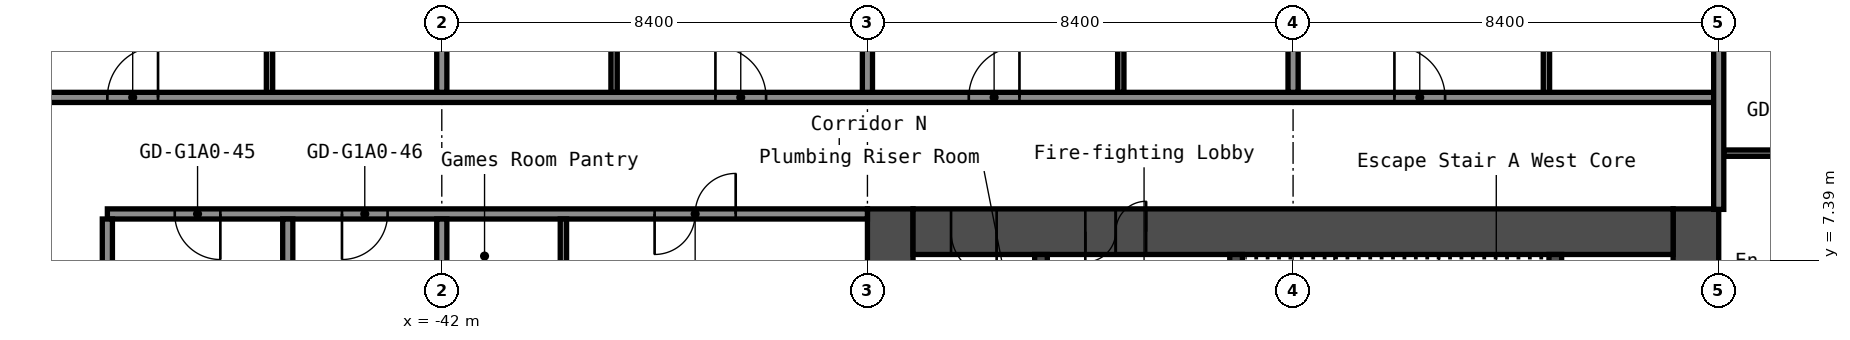
"""IFC4 building model, lengths in metres.
Left out: names, types, materials, properties, quantities, classifications, styles, units other than length and angle.
Written with IfcOpenShell. Run it as: python <this file> out.ifc"""

import sys

from ifc_helpers import new_model, si_unit, direction, frame, frame_2d, origin, place, context, subcontext, project, spatial, rectangle, extrude, element, fill, save


model = new_model("IFC4")
c1 = context("Model", 3, precision=1e-05, world=origin(), true_north=direction((0.0, 1.0)))
c2 = subcontext(c1, "Body", "Model", "MODEL_VIEW")
j1 = project(units=[si_unit("LENGTHUNIT", "METRE"), si_unit("PLANEANGLEUNIT", "RADIAN")], contexts=[c1])
p1 = place(None, origin())
s1 = spatial("IfcSite", under=j1, at=p1, CompositionType="ELEMENT")
p2 = place(p1, origin())
s2 = spatial("IfcBuilding", under=s1, at=p2, CompositionType="ELEMENT")
p3 = place(p2, frame((0.0, 0.0, 19.8)))
s3 = spatial("IfcBuildingStorey", under=s2, at=p3, CompositionType="ELEMENT", Elevation=19.8)
p4 = place(p3, frame((-17.25, -8.4, 0.0), z_axis=(0.0, 0.0, 1.0), x_axis=(0.0, 1.0, 0.0)))
e1 = element("IfcWall", 1, at=p4, inside=s3, PredefinedType="SHEAR", context=c2, shape_type="SweptSolid", body=[
    extrude(rectangle(XDim=16.8, YDim=0.9, at=frame_2d((8.4, 0.0))), origin(), (0.0, 0.0, 1.0), 2.8),
])
p5 = place(p4, frame((12.75, 0.0, 0.0)))
e2 = element("IfcOpeningElement", 2, at=p5, cuts=e1, PredefinedType="OPENING", context=c2, shape_type="SweptSolid", body=[
    extrude(rectangle(XDim=1.2, YDim=2.1, at=frame_2d((0.6, 1.05))), frame((0.0, 0.46, 0.0), z_axis=(0.0, -1.0, 0.0), x_axis=(1.0, 0.0, 0.0)), (0.0, 0.0, 1.0), 0.92),
])
p6 = place(p4, frame((2.85, 0.0, 0.0)))
e3 = element("IfcOpeningElement", 3, at=p6, cuts=e1, PredefinedType="OPENING", context=c2, shape_type="SweptSolid", body=[
    extrude(rectangle(XDim=1.2, YDim=2.1, at=frame_2d((0.6, 1.05))), frame((0.0, 0.46, 0.0), z_axis=(0.0, -1.0, 0.0), x_axis=(1.0, 0.0, 0.0)), (0.0, 0.0, 1.0), 0.92),
])
p7 = place(p3, frame((-33.15, -8.4, 0.0), z_axis=(0.0, 0.0, 1.0), x_axis=(0.0, 1.0, 0.0)))
e4 = element("IfcWall", 4, at=p7, inside=s3, PredefinedType="SHEAR", context=c2, shape_type="SweptSolid", body=[
    extrude(rectangle(XDim=16.8, YDim=0.9, at=frame_2d((8.4, 0.0))), origin(), (0.0, 0.0, 1.0), 2.8),
])
p8 = place(p3, frame((-32.7, 7.95, 0.0), z_axis=(0.0, 0.0, 1.0), x_axis=(1.0, 0.0, 0.0)))
e5 = element("IfcWall", 5, at=p8, inside=s3, PredefinedType="SHEAR", context=c2, shape_type="SweptSolid", body=[
    extrude(rectangle(XDim=15.0, YDim=0.9, at=frame_2d((7.5, 0.0))), origin(), (0.0, 0.0, 1.0), 2.8),
])
p9 = place(p8, frame((3.4, 0.0, 0.0)))
e6 = element("IfcOpeningElement", 6, at=p9, cuts=e5, PredefinedType="OPENING", context=c2, shape_type="SweptSolid", body=[
    extrude(rectangle(XDim=1.2, YDim=2.1, at=frame_2d((0.6, 1.05))), frame((0.0, 0.46, 0.0), z_axis=(0.0, -1.0, 0.0), x_axis=(1.0, 0.0, 0.0)), (0.0, 0.0, 1.0), 0.92),
])
p10 = place(p8, frame((0.75, 0.0, 0.0)))
e7 = element("IfcOpeningElement", 7, at=p10, cuts=e5, PredefinedType="OPENING", context=c2, shape_type="SweptSolid", body=[
    extrude(rectangle(XDim=0.9, YDim=2.1, at=frame_2d((0.45, 1.05))), frame((0.0, 0.46, 0.0), z_axis=(0.0, -1.0, 0.0), x_axis=(1.0, 0.0, 0.0)), (0.0, 0.0, 1.0), 0.92),
])
p11 = place(p3, frame((-20.025, 1.2, 0.0), z_axis=(0.0, 0.0, 1.0), x_axis=(0.0, 1.0, 0.0)))
e8 = element("IfcWall", 8, at=p11, inside=s3, PredefinedType="SHEAR", context=c2, shape_type="SweptSolid", body=[
    extrude(rectangle(XDim=6.3, YDim=0.25, at=frame_2d((3.15, 0.0))), origin(), (0.0, 0.0, 1.0), 2.8),
])
p12 = place(p3, frame((-26.325, 3.75, 0.0), z_axis=(0.0, 0.0, 1.0), x_axis=(0.0, 1.0, 0.0)))
e9 = element("IfcWall", 9, at=p12, inside=s3, PredefinedType="SHEAR", context=c2, shape_type="SweptSolid", body=[
    extrude(rectangle(XDim=3.75, YDim=0.25, at=frame_2d((1.875, 0.0))), origin(), (0.0, 0.0, 1.0), 2.8),
])
p13 = place(p12, frame((1.25, 0.0, 0.0)))
e10 = element("IfcOpeningElement", 10, at=p13, cuts=e9, PredefinedType="OPENING", context=c2, shape_type="SweptSolid", body=[
    extrude(rectangle(XDim=1.2, YDim=2.1, at=frame_2d((0.6, 1.05))), frame((0.0, 0.135, 0.0), z_axis=(0.0, -1.0, 0.0), x_axis=(1.0, 0.0, 0.0)), (0.0, 0.0, 1.0), 0.27),
])
p14 = place(p3, frame((-30.175, 1.45, 0.0), z_axis=(0.0, 0.0, 1.0), x_axis=(0.0, 1.0, 0.0)))
e11 = element("IfcWall", 11, at=p14, inside=s3, PredefinedType="SHEAR", context=c2, shape_type="SweptSolid", body=[
    extrude(rectangle(XDim=6.05, YDim=0.25, at=frame_2d((3.025, 0.0))), origin(), (0.0, 0.0, 1.0), 2.8),
])
p15 = place(p14, frame((2.625, 0.0, 0.0)))
e12 = element("IfcOpeningElement", 12, at=p15, cuts=e11, PredefinedType="OPENING", context=c2, shape_type="SweptSolid", body=[
    extrude(rectangle(XDim=1.1, YDim=2.1, at=frame_2d((0.55, 1.05))), frame((0.0, 0.135, 0.0), z_axis=(0.0, -1.0, 0.0), x_axis=(1.0, 0.0, 0.0)), (0.0, 0.0, 1.0), 0.27),
])
p16 = place(p3, frame((-48.6, 8.3, 0.0), z_axis=(0.0, 0.0, 1.0), x_axis=(1.0, 0.0, 0.0)))
e13 = element("IfcWall", 13, at=p16, inside=s3, PredefinedType="PARTITIONING", context=c2, shape_type="SweptSolid", body=[
    extrude(rectangle(XDim=15.0, YDim=0.2, at=frame_2d((7.5, 0.0))), origin(), (0.0, 0.0, 1.0), 2.8),
])
p17 = place(p16, frame((1.33, 0.0, 0.0)))
e14 = element("IfcOpeningElement", 14, at=p17, cuts=e13, PredefinedType="OPENING", context=c2, shape_type="SweptSolid", body=[
    extrude(rectangle(XDim=0.9, YDim=2.1, at=frame_2d((0.45, 1.05))), frame((0.0, 0.11, 0.0), z_axis=(0.0, -1.0, 0.0), x_axis=(1.0, 0.0, 0.0)), (0.0, 0.0, 1.0), 0.22),
])
p18 = place(p16, frame((4.63, 0.0, 0.0)))
e15 = element("IfcOpeningElement", 15, at=p18, cuts=e13, PredefinedType="OPENING", context=c2, shape_type="SweptSolid", body=[
    extrude(rectangle(XDim=0.9, YDim=2.1, at=frame_2d((0.45, 1.05))), frame((0.0, 0.11, 0.0), z_axis=(0.0, -1.0, 0.0), x_axis=(1.0, 0.0, 0.0)), (0.0, 0.0, 1.0), 0.22),
])
p19 = place(p16, frame((10.8, 0.0, 0.0)))
e16 = element("IfcOpeningElement", 16, at=p19, cuts=e13, PredefinedType="OPENING", context=c2, shape_type="SweptSolid", body=[
    extrude(rectangle(XDim=1.6, YDim=2.1, at=frame_2d((0.8, 1.05))), frame((0.0, 0.11, 0.0), z_axis=(0.0, -1.0, 0.0), x_axis=(1.0, 0.0, 0.0)), (0.0, 0.0, 1.0), 0.22),
])
p20 = place(p3, frame((-16.7, 9.5, 0.0), z_axis=(0.0, 0.0, 1.0), x_axis=(1.0, 0.0, 0.0)))
e17 = element("IfcWall", 17, at=p20, inside=s3, PredefinedType="PARTITIONING", context=c2, shape_type="SweptSolid", body=[
    extrude(rectangle(XDim=3.238, YDim=0.125, at=frame_2d((1.619, 0.0))), origin(), (0.0, 0.0, 1.0), 2.8),
])
p21 = place(p20, frame((1.2, 0.0, 0.0)))
e18 = element("IfcOpeningElement", 18, at=p21, cuts=e17, PredefinedType="OPENING", context=c2, shape_type="SweptSolid", body=[
    extrude(rectangle(XDim=0.8, YDim=2.1, at=frame_2d((0.4, 1.05))), frame((0.0, 0.073, 0.0), z_axis=(0.0, -1.0, 0.0), x_axis=(1.0, 0.0, 0.0)), (0.0, 0.0, 1.0), 0.145),
])
p22 = place(p3, frame((-51.1, 10.6, 0.0), z_axis=(0.0, 0.0, 1.0), x_axis=(1.0, 0.0, 0.0)))
e19 = element("IfcWall", 19, at=p22, inside=s3, PredefinedType="PARTITIONING", context=c2, shape_type="SweptSolid", body=[
    extrude(rectangle(XDim=34.3, YDim=0.2, at=frame_2d((17.15, 0.0))), origin(), (0.0, 0.0, 1.0), 2.8),
])
p23 = place(p22, frame((2.5, 0.0, 0.0)))
e20 = element("IfcOpeningElement", 20, at=p23, cuts=e19, PredefinedType="OPENING", context=c2, shape_type="SweptSolid", body=[
    extrude(rectangle(XDim=1.0, YDim=2.1, at=frame_2d((0.5, 1.05))), frame((0.0, 0.11, 0.0), z_axis=(0.0, -1.0, 0.0), x_axis=(1.0, 0.0, 0.0)), (0.0, 0.0, 1.0), 0.22),
])
p24 = place(p22, frame((14.5, 0.0, 0.0)))
e21 = element("IfcOpeningElement", 21, at=p24, cuts=e19, PredefinedType="OPENING", context=c2, shape_type="SweptSolid", body=[
    extrude(rectangle(XDim=1.0, YDim=2.1, at=frame_2d((0.5, 1.05))), frame((0.0, 0.11, 0.0), z_axis=(0.0, -1.0, 0.0), x_axis=(1.0, 0.0, 0.0)), (0.0, 0.0, 1.0), 0.22),
])
p25 = place(p22, frame((19.5, 0.0, 0.0)))
e22 = element("IfcOpeningElement", 22, at=p25, cuts=e19, PredefinedType="OPENING", context=c2, shape_type="SweptSolid", body=[
    extrude(rectangle(XDim=1.0, YDim=2.1, at=frame_2d((0.5, 1.05))), frame((0.0, 0.11, 0.0), z_axis=(0.0, -1.0, 0.0), x_axis=(1.0, 0.0, 0.0)), (0.0, 0.0, 1.0), 0.22),
])
p26 = place(p22, frame((27.9, 0.0, 0.0)))
e23 = element("IfcOpeningElement", 23, at=p26, cuts=e19, PredefinedType="OPENING", context=c2, shape_type="SweptSolid", body=[
    extrude(rectangle(XDim=1.0, YDim=2.1, at=frame_2d((0.5, 1.05))), frame((0.0, 0.11, 0.0), z_axis=(0.0, -1.0, 0.0), x_axis=(1.0, 0.0, 0.0)), (0.0, 0.0, 1.0), 0.22),
])
p27 = place(p3, frame((-48.6, -8.2, 0.0), z_axis=(0.0, 0.0, 1.0), x_axis=(0.0, 1.0, 0.0)))
e24 = element("IfcWall", 24, at=p27, inside=s3, PredefinedType="PARTITIONING", context=c2, shape_type="SweptSolid", body=[
    extrude(rectangle(XDim=16.4, YDim=0.2, at=frame_2d((8.2, 0.0))), origin(), (0.0, 0.0, 1.0), 2.8),
])
p28 = place(p3, frame((-45.4, 10.7, 0.0), z_axis=(0.0, 0.0, 1.0), x_axis=(0.0, 1.0, 0.0)))
e25 = element("IfcWall", 25, at=p28, inside=s3, PredefinedType="PARTITIONING", context=c2, shape_type="SweptSolid", body=[
    extrude(rectangle(XDim=3.3, YDim=0.125, at=frame_2d((1.65, 0.0))), origin(), (0.0, 0.0, 1.0), 2.8),
])
p29 = place(p3, frame((-45.04, 0.0, 0.0), z_axis=(0.0, 0.0, 1.0), x_axis=(0.0, 1.0, 0.0)))
e26 = element("IfcWall", 26, at=p29, inside=s3, PredefinedType="PARTITIONING", context=c2, shape_type="SweptSolid", body=[
    extrude(rectangle(XDim=8.2, YDim=0.2, at=frame_2d((4.1, 0.0))), origin(), (0.0, 0.0, 1.0), 2.8),
])
p30 = place(p3, frame((-42.0, -8.2, 0.0), z_axis=(0.0, 0.0, 1.0), x_axis=(0.0, 1.0, 0.0)))
e27 = element("IfcWall", 27, at=p30, inside=s3, PredefinedType="PARTITIONING", context=c2, shape_type="SweptSolid", body=[
    extrude(rectangle(XDim=16.4, YDim=0.2, at=frame_2d((8.2, 0.0))), origin(), (0.0, 0.0, 1.0), 2.8),
])
p31 = place(p3, frame((-42.0, 10.7, 0.0), z_axis=(0.0, 0.0, 1.0), x_axis=(0.0, 1.0, 0.0)))
e28 = element("IfcWall", 28, at=p31, inside=s3, PredefinedType="PARTITIONING", context=c2, shape_type="SweptSolid", body=[
    extrude(rectangle(XDim=9.6, YDim=0.2, at=frame_2d((4.8, 0.0))), origin(), (0.0, 0.0, 1.0), 2.8),
])
p32 = place(p3, frame((-39.6, 5.7, 0.0), z_axis=(0.0, 0.0, 1.0), x_axis=(0.0, 1.0, 0.0)))
e29 = element("IfcWall", 29, at=p32, inside=s3, PredefinedType="PARTITIONING", context=c2, shape_type="SweptSolid", body=[
    extrude(rectangle(XDim=2.5, YDim=0.125, at=frame_2d((1.25, 0.0))), origin(), (0.0, 0.0, 1.0), 2.8),
])
p33 = place(p32, frame((0.55, 0.0, 0.0)))
e30 = element("IfcOpeningElement", 30, at=p33, cuts=e29, PredefinedType="OPENING", context=c2, shape_type="SweptSolid", body=[
    extrude(rectangle(XDim=0.9, YDim=2.1, at=frame_2d((0.45, 1.05))), frame((0.0, 0.073, 0.0), z_axis=(0.0, -1.0, 0.0), x_axis=(1.0, 0.0, 0.0)), (0.0, 0.0, 1.0), 0.145),
])
p34 = place(p3, frame((-38.6, 10.7, 0.0), z_axis=(0.0, 0.0, 1.0), x_axis=(0.0, 1.0, 0.0)))
e31 = element("IfcWall", 31, at=p34, inside=s3, PredefinedType="PARTITIONING", context=c2, shape_type="SweptSolid", body=[
    extrude(rectangle(XDim=3.3, YDim=0.125, at=frame_2d((1.65, 0.0))), origin(), (0.0, 0.0, 1.0), 2.8),
])
p35 = place(p3, frame((-33.6, 10.7, 0.0), z_axis=(0.0, 0.0, 1.0), x_axis=(0.0, 1.0, 0.0)))
e32 = element("IfcWall", 32, at=p35, inside=s3, PredefinedType="PARTITIONING", context=c2, shape_type="SweptSolid", body=[
    extrude(rectangle(XDim=9.6, YDim=0.2, at=frame_2d((4.8, 0.0))), origin(), (0.0, 0.0, 1.0), 2.8),
])
p36 = place(p3, frame((-28.6, 10.7, 0.0), z_axis=(0.0, 0.0, 1.0), x_axis=(0.0, 1.0, 0.0)))
e33 = element("IfcWall", 33, at=p36, inside=s3, PredefinedType="PARTITIONING", context=c2, shape_type="SweptSolid", body=[
    extrude(rectangle(XDim=3.3, YDim=0.125, at=frame_2d((1.65, 0.0))), origin(), (0.0, 0.0, 1.0), 2.8),
])
p37 = place(p3, frame((-25.2, 10.7, 0.0), z_axis=(0.0, 0.0, 1.0), x_axis=(0.0, 1.0, 0.0)))
e34 = element("IfcWall", 34, at=p37, inside=s3, PredefinedType="PARTITIONING", context=c2, shape_type="SweptSolid", body=[
    extrude(rectangle(XDim=9.6, YDim=0.2, at=frame_2d((4.8, 0.0))), origin(), (0.0, 0.0, 1.0), 2.8),
])
p38 = place(p3, frame((-20.2, 10.7, 0.0), z_axis=(0.0, 0.0, 1.0), x_axis=(0.0, 1.0, 0.0)))
e35 = element("IfcWall", 35, at=p38, inside=s3, PredefinedType="PARTITIONING", context=c2, shape_type="SweptSolid", body=[
    extrude(rectangle(XDim=3.3, YDim=0.125, at=frame_2d((1.65, 0.0))), origin(), (0.0, 0.0, 1.0), 2.8),
])
p39 = place(p3, frame((-16.8, 8.39, 0.0), z_axis=(0.0, 0.0, 1.0), x_axis=(0.0, 1.0, 0.0)))
e36 = element("IfcWall", 36, at=p39, inside=s3, PredefinedType="PARTITIONING", context=c2, shape_type="SweptSolid", body=[
    extrude(rectangle(XDim=11.91, YDim=0.2, at=frame_2d((5.955, 0.0))), origin(), (0.0, 0.0, 1.0), 2.8),
])
p40 = place(p9, origin())
e37 = element("IfcDoor", 37, at=p40, inside=s3, OperationType="DOUBLE_DOOR_SINGLE_SWING", PredefinedType="DOOR", context=c2, shape_type="SweptSolid", body=[
    extrude(rectangle(XDim=1.2, YDim=2.1, at=frame_2d((0.6, 1.05))), frame((0.0, 0.025, 0.0), z_axis=(0.0, -1.0, 0.0), x_axis=(1.0, 0.0, 0.0)), (0.0, 0.0, 1.0), 0.05),
])
fill(e6, e37)
p41 = place(p10, origin())
e38 = element("IfcDoor", 38, at=p41, inside=s3, OperationType="SINGLE_SWING_RIGHT", PredefinedType="DOOR", context=c2, shape_type="SweptSolid", body=[
    extrude(rectangle(XDim=0.9, YDim=2.1, at=frame_2d((0.45, 1.05))), frame((0.0, 0.025, 0.0), z_axis=(0.0, -1.0, 0.0), x_axis=(1.0, 0.0, 0.0)), (0.0, 0.0, 1.0), 0.05),
])
fill(e7, e38)
p42 = place(p17, origin())
e39 = element("IfcDoor", 39, at=p42, inside=s3, OperationType="SINGLE_SWING_RIGHT", PredefinedType="DOOR", context=c2, shape_type="SweptSolid", body=[
    extrude(rectangle(XDim=0.9, YDim=2.1, at=frame_2d((0.45, 1.05))), frame((0.0, 0.025, 0.0), z_axis=(0.0, -1.0, 0.0), x_axis=(1.0, 0.0, 0.0)), (0.0, 0.0, 1.0), 0.05),
])
fill(e14, e39)
p43 = place(p18, origin())
e40 = element("IfcDoor", 40, at=p43, inside=s3, OperationType="SINGLE_SWING_LEFT", PredefinedType="DOOR", context=c2, shape_type="SweptSolid", body=[
    extrude(rectangle(XDim=0.9, YDim=2.1, at=frame_2d((0.45, 1.05))), frame((0.0, 0.025, 0.0), z_axis=(0.0, -1.0, 0.0), x_axis=(1.0, 0.0, 0.0)), (0.0, 0.0, 1.0), 0.05),
])
fill(e15, e40)
p44 = place(p19, origin())
e41 = element("IfcDoor", 41, at=p44, inside=s3, OperationType="DOUBLE_DOOR_SINGLE_SWING", PredefinedType="DOOR", context=c2, shape_type="SweptSolid", body=[
    extrude(rectangle(XDim=1.6, YDim=2.1, at=frame_2d((0.8, 1.05))), frame((0.0, 0.025, 0.0), z_axis=(0.0, -1.0, 0.0), x_axis=(1.0, 0.0, 0.0)), (0.0, 0.0, 1.0), 0.05),
])
fill(e16, e41)
p45 = place(p23, origin())
e42 = element("IfcDoor", 42, at=p45, inside=s3, OperationType="SINGLE_SWING_LEFT", PredefinedType="DOOR", context=c2, shape_type="SweptSolid", body=[
    extrude(rectangle(XDim=1.0, YDim=2.1, at=frame_2d((0.5, 1.05))), frame((0.0, 0.025, 0.0), z_axis=(0.0, -1.0, 0.0), x_axis=(1.0, 0.0, 0.0)), (0.0, 0.0, 1.0), 0.05),
])
fill(e20, e42)
p46 = place(p24, origin())
e43 = element("IfcDoor", 43, at=p46, inside=s3, OperationType="SINGLE_SWING_RIGHT", PredefinedType="DOOR", context=c2, shape_type="SweptSolid", body=[
    extrude(rectangle(XDim=1.0, YDim=2.1, at=frame_2d((0.5, 1.05))), frame((0.0, 0.025, 0.0), z_axis=(0.0, -1.0, 0.0), x_axis=(1.0, 0.0, 0.0)), (0.0, 0.0, 1.0), 0.05),
])
fill(e21, e43)
p47 = place(p25, origin())
e44 = element("IfcDoor", 44, at=p47, inside=s3, OperationType="SINGLE_SWING_LEFT", PredefinedType="DOOR", context=c2, shape_type="SweptSolid", body=[
    extrude(rectangle(XDim=1.0, YDim=2.1, at=frame_2d((0.5, 1.05))), frame((0.0, 0.025, 0.0), z_axis=(0.0, -1.0, 0.0), x_axis=(1.0, 0.0, 0.0)), (0.0, 0.0, 1.0), 0.05),
])
fill(e22, e44)
p48 = place(p26, origin())
e45 = element("IfcDoor", 45, at=p48, inside=s3, OperationType="SINGLE_SWING_RIGHT", PredefinedType="DOOR", context=c2, shape_type="SweptSolid", body=[
    extrude(rectangle(XDim=1.0, YDim=2.1, at=frame_2d((0.5, 1.05))), frame((0.0, 0.025, 0.0), z_axis=(0.0, -1.0, 0.0), x_axis=(1.0, 0.0, 0.0)), (0.0, 0.0, 1.0), 0.05),
])
fill(e23, e45)
save(model, sys.argv[1])
